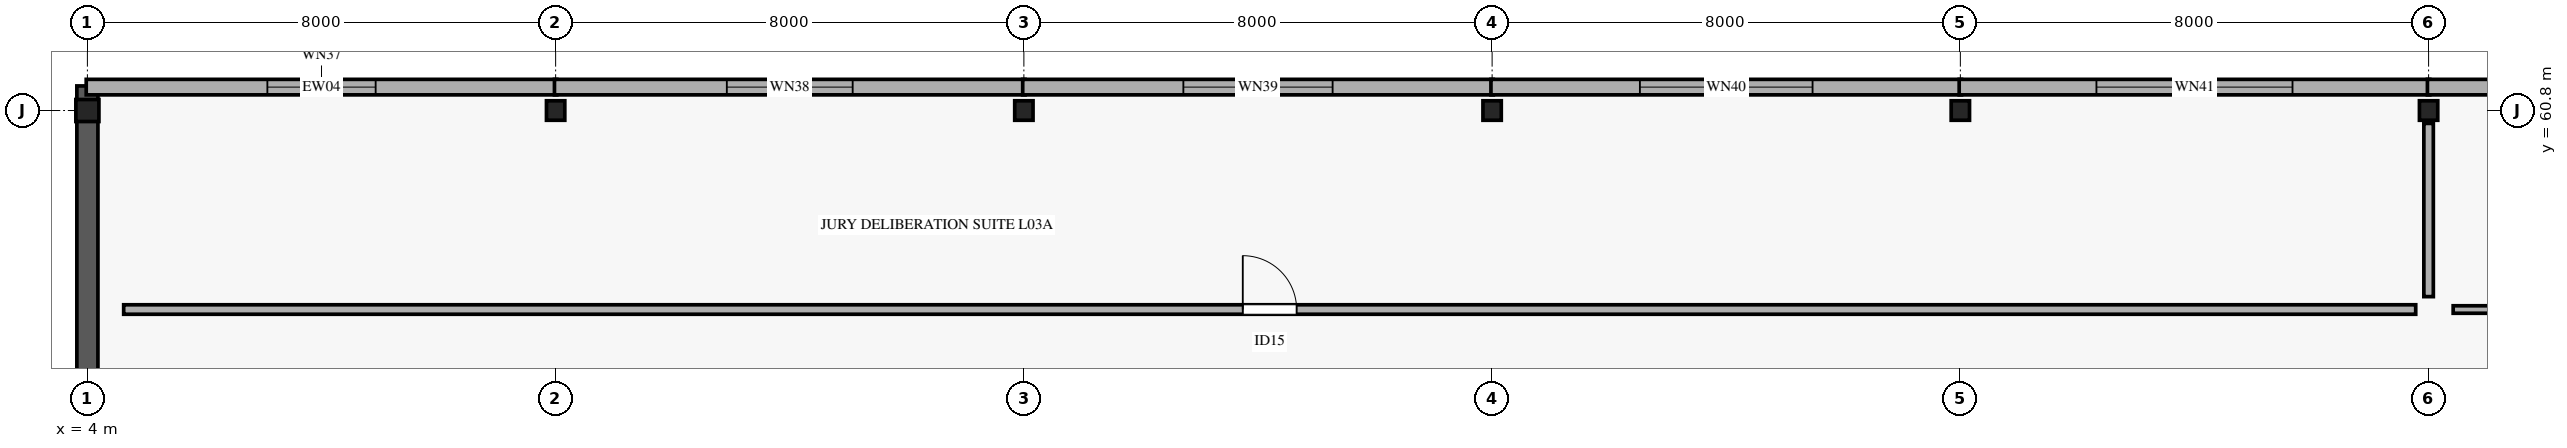
"""IFC4 building model, lengths in metres.
Left out: names, types, materials, properties, quantities, classifications, styles, units other than length and angle.
Written with IfcOpenShell. Run it as: python <this file> out.ifc"""

import sys

from ifc_helpers import new_model, si_unit, direction, frame, frame_2d, origin, origin_2d, place, context, subcontext, project, spatial, rectangle, i_section, extrude, element, fill, save


model = new_model("IFC4")
c1 = context("Model", 3, precision=1e-05, world=origin(), true_north=direction((0.0, 1.0)))
c2 = subcontext(c1, "Body", "Model", "MODEL_VIEW")
j1 = project(units=[si_unit("LENGTHUNIT", "METRE"), si_unit("PLANEANGLEUNIT", "RADIAN")], contexts=[c1])
p1 = place(None, origin())
s1 = spatial("IfcSite", under=j1, at=p1, CompositionType="ELEMENT")
p2 = place(p1, origin())
s2 = spatial("IfcBuilding", under=s1, at=p2, CompositionType="ELEMENT")
p3 = place(p2, frame((0.0, 0.0, 15.6)))
s3 = spatial("IfcBuildingStorey", under=s2, at=p3, CompositionType="ELEMENT", Elevation=15.6)
p4 = place(p3, frame((4.0, 60.8, 0.0), z_axis=(0.0, 0.0, 1.0), x_axis=(1.0, 0.0, 0.0)))
e1 = element("IfcColumn", 1, at=p4, inside=s3, PredefinedType="COLUMN", context=c2, shape_type="SweptSolid", body=[
    extrude(i_section(OverallWidth=0.394, OverallDepth=0.376, WebThickness=0.017, FlangeThickness=0.028, FilletRadius=0.015, at=origin_2d()), origin(), (0.0, 0.0, 1.0), 4.59),
])
for number, where, z_axis, x_axis in (
    (2, (12.0, 60.8, 0.0), (0.0, 0.0, 1.0), (1.0, 0.0, 0.0)),
    (3, (20.0, 60.8, 0.0), (0.0, 0.0, 1.0), (1.0, 0.0, 0.0)),
    (4, (28.0, 60.8, 0.0), (0.0, 0.0, 1.0), (1.0, 0.0, 0.0)),
    (5, (36.0, 60.8, 0.0), (0.0, 0.0, 1.0), (1.0, 0.0, 0.0)),
    (6, (44.0, 60.8, 0.0), (0.0, 0.0, 1.0), (1.0, 0.0, 0.0)),
):
    element("IfcColumn", number, at=place(p3, frame(where, z_axis=z_axis, x_axis=x_axis)), inside=s3, PredefinedType="COLUMN", context=c2, shape_type="SweptSolid", body=[
        extrude(i_section(OverallWidth=0.313, OverallDepth=0.333, WebThickness=0.018, FlangeThickness=0.028, FilletRadius=0.015, at=origin_2d()), origin(), (0.0, 0.0, 1.0), 4.59),
    ])
p5 = place(p3, frame((4.0, 53.18, 0.0), z_axis=(0.0, 0.0, 1.0), x_axis=(0.0, 1.0, 0.0)))
e7 = element("IfcWall", 7, at=p5, inside=s3, PredefinedType="STANDARD", context=c2, shape_type="SweptSolid", body=[
    extrude(rectangle(XDim=8.04, YDim=0.36, at=frame_2d((4.02, 0.0))), origin(), (0.0, 0.0, 1.0), 4.6),
])
p6 = place(p3, frame((3.98, 61.2, 0.0), z_axis=(0.0, 0.0, 1.0), x_axis=(1.0, 0.0, 0.0)))
e8 = element("IfcWall", 8, at=p6, inside=s3, PredefinedType="STANDARD", context=c2, shape_type="SweptSolid", body=[
    extrude(rectangle(XDim=8.04, YDim=0.265, at=frame_2d((4.02, 0.0))), origin(), (0.0, 0.0, 1.0), 3.66),
])
p7 = place(p6, frame((3.095, 0.0, 0.75)))
e9 = element("IfcOpeningElement", 9, at=p7, cuts=e8, PredefinedType="OPENING", context=c2, shape_type="SweptSolid", body=[
    extrude(rectangle(XDim=1.85, YDim=1.9, at=frame_2d((0.925, 0.95))), frame((0.0, 0.142, 0.0), z_axis=(0.0, -1.0, 0.0), x_axis=(1.0, 0.0, 0.0)), (0.0, 0.0, 1.0), 0.285),
])
p8 = place(p3, frame((11.98, 61.2, 0.0), z_axis=(0.0, 0.0, 1.0), x_axis=(1.0, 0.0, 0.0)))
e10 = element("IfcWall", 10, at=p8, inside=s3, PredefinedType="STANDARD", context=c2, shape_type="SweptSolid", body=[
    extrude(rectangle(XDim=8.04, YDim=0.265, at=frame_2d((4.02, 0.0))), origin(), (0.0, 0.0, 1.0), 3.66),
])
p9 = place(p8, frame((2.945, 0.0, 0.75)))
e11 = element("IfcOpeningElement", 11, at=p9, cuts=e10, PredefinedType="OPENING", context=c2, shape_type="SweptSolid", body=[
    extrude(rectangle(XDim=2.15, YDim=1.9, at=frame_2d((1.075, 0.95))), frame((0.0, 0.142, 0.0), z_axis=(0.0, -1.0, 0.0), x_axis=(1.0, 0.0, 0.0)), (0.0, 0.0, 1.0), 0.285),
])
p10 = place(p3, frame((19.98, 61.2, 0.0), z_axis=(0.0, 0.0, 1.0), x_axis=(1.0, 0.0, 0.0)))
e12 = element("IfcWall", 12, at=p10, inside=s3, PredefinedType="STANDARD", context=c2, shape_type="SweptSolid", body=[
    extrude(rectangle(XDim=8.04, YDim=0.265, at=frame_2d((4.02, 0.0))), origin(), (0.0, 0.0, 1.0), 3.66),
])
p11 = place(p10, frame((2.745, 0.0, 0.75)))
e13 = element("IfcOpeningElement", 13, at=p11, cuts=e12, PredefinedType="OPENING", context=c2, shape_type="SweptSolid", body=[
    extrude(rectangle(XDim=2.55, YDim=1.9, at=frame_2d((1.275, 0.95))), frame((0.0, 0.142, 0.0), z_axis=(0.0, -1.0, 0.0), x_axis=(1.0, 0.0, 0.0)), (0.0, 0.0, 1.0), 0.285),
])
p12 = place(p3, frame((27.98, 61.2, 0.0), z_axis=(0.0, 0.0, 1.0), x_axis=(1.0, 0.0, 0.0)))
e14 = element("IfcWall", 14, at=p12, inside=s3, PredefinedType="STANDARD", context=c2, shape_type="SweptSolid", body=[
    extrude(rectangle(XDim=8.04, YDim=0.265, at=frame_2d((4.02, 0.0))), origin(), (0.0, 0.0, 1.0), 3.66),
])
p13 = place(p12, frame((2.545, 0.0, 0.75)))
e15 = element("IfcOpeningElement", 15, at=p13, cuts=e14, PredefinedType="OPENING", context=c2, shape_type="SweptSolid", body=[
    extrude(rectangle(XDim=2.95, YDim=1.9, at=frame_2d((1.475, 0.95))), frame((0.0, 0.142, 0.0), z_axis=(0.0, -1.0, 0.0), x_axis=(1.0, 0.0, 0.0)), (0.0, 0.0, 1.0), 0.285),
])
p14 = place(p3, frame((35.98, 61.2, 0.0), z_axis=(0.0, 0.0, 1.0), x_axis=(1.0, 0.0, 0.0)))
e16 = element("IfcWall", 16, at=p14, inside=s3, PredefinedType="STANDARD", context=c2, shape_type="SweptSolid", body=[
    extrude(rectangle(XDim=8.04, YDim=0.265, at=frame_2d((4.02, 0.0))), origin(), (0.0, 0.0, 1.0), 3.66),
])
p15 = place(p14, frame((2.345, 0.0, 0.75)))
e17 = element("IfcOpeningElement", 17, at=p15, cuts=e16, PredefinedType="OPENING", context=c2, shape_type="SweptSolid", body=[
    extrude(rectangle(XDim=3.35, YDim=1.9, at=frame_2d((1.675, 0.95))), frame((0.0, 0.142, 0.0), z_axis=(0.0, -1.0, 0.0), x_axis=(1.0, 0.0, 0.0)), (0.0, 0.0, 1.0), 0.285),
])
p16 = place(p3, frame((43.98, 61.2, 0.0), z_axis=(0.0, 0.0, 1.0), x_axis=(1.0, 0.0, 0.0)))
e18 = element("IfcWall", 18, at=p16, inside=s3, PredefinedType="STANDARD", context=c2, shape_type="SweptSolid", body=[
    extrude(rectangle(XDim=8.04, YDim=0.265, at=frame_2d((4.02, 0.0))), origin(), (0.0, 0.0, 1.0), 3.66),
])
p17 = place(p16, frame((3.32, 0.0, 0.75)))
e19 = element("IfcOpeningElement", 19, at=p17, cuts=e18, PredefinedType="OPENING", context=c2, shape_type="SweptSolid", body=[
    extrude(rectangle(XDim=1.4, YDim=1.65, at=frame_2d((0.7, 0.825))), frame((0.0, 0.142, 0.0), z_axis=(0.0, -1.0, 0.0), x_axis=(1.0, 0.0, 0.0)), (0.0, 0.0, 1.0), 0.285),
])
p18 = place(p3, frame((4.62, 57.4, 0.0), z_axis=(0.0, 0.0, 1.0), x_axis=(1.0, 0.0, 0.0)))
e20 = element("IfcWall", 20, at=p18, inside=s3, PredefinedType="PARTITIONING", context=c2, shape_type="SweptSolid", body=[
    extrude(rectangle(XDim=39.16, YDim=0.162, at=frame_2d((19.58, 0.0))), origin(), (0.0, 0.0, 1.0), 3.45),
])
p19 = place(p18, frame((19.12, 0.0, 0.0)))
e21 = element("IfcOpeningElement", 21, at=p19, cuts=e20, PredefinedType="OPENING", context=c2, shape_type="SweptSolid", body=[
    extrude(rectangle(XDim=0.92, YDim=2.2, at=frame_2d((0.46, 1.1))), frame((0.0, 0.091, 0.0), z_axis=(0.0, -1.0, 0.0), x_axis=(1.0, 0.0, 0.0)), (0.0, 0.0, 1.0), 0.182),
])
p20 = place(p3, frame((44.0, 57.62, 0.0), z_axis=(0.0, 0.0, 1.0), x_axis=(0.0, 1.0, 0.0)))
e22 = element("IfcWall", 22, at=p20, inside=s3, PredefinedType="PARTITIONING", context=c2, shape_type="SweptSolid", body=[
    extrude(rectangle(XDim=2.96, YDim=0.162, at=frame_2d((1.48, 0.0))), origin(), (0.0, 0.0, 1.0), 3.45),
])
p21 = place(p3, frame((44.42, 57.4, 0.0), z_axis=(0.0, 0.0, 1.0), x_axis=(1.0, 0.0, 0.0)))
e23 = element("IfcWall", 23, at=p21, inside=s3, PredefinedType="PARTITIONING", context=c2, shape_type="SweptSolid", body=[
    extrude(rectangle(XDim=22.96, YDim=0.128, at=frame_2d((11.48, 0.0))), origin(), (0.0, 0.0, 1.0), 3.45),
])
p22 = place(p21, frame((10.705, 0.0, 0.0)))
e24 = element("IfcOpeningElement", 24, at=p22, cuts=e23, PredefinedType="OPENING", context=c2, shape_type="SweptSolid", body=[
    extrude(rectangle(XDim=1.55, YDim=2.3, at=frame_2d((0.775, 1.15))), frame((0.0, 0.074, 0.0), z_axis=(0.0, -1.0, 0.0), x_axis=(1.0, 0.0, 0.0)), (0.0, 0.0, 1.0), 0.148),
])
p23 = place(p7, origin())
e25 = element("IfcWindow", 25, at=p23, inside=s3, PartitioningType="SINGLE_PANEL", PredefinedType="WINDOW", context=c2, shape_type="SweptSolid", body=[
    extrude(rectangle(XDim=1.85, YDim=1.9, at=frame_2d((0.925, 0.95))), frame((0.0, 0.03, 0.0), z_axis=(0.0, -1.0, 0.0), x_axis=(1.0, 0.0, 0.0)), (0.0, 0.0, 1.0), 0.06),
])
fill(e9, e25)
p24 = place(p9, origin())
e26 = element("IfcWindow", 26, at=p24, inside=s3, PartitioningType="SINGLE_PANEL", PredefinedType="WINDOW", context=c2, shape_type="SweptSolid", body=[
    extrude(rectangle(XDim=2.15, YDim=1.9, at=frame_2d((1.075, 0.95))), frame((0.0, 0.03, 0.0), z_axis=(0.0, -1.0, 0.0), x_axis=(1.0, 0.0, 0.0)), (0.0, 0.0, 1.0), 0.06),
])
fill(e11, e26)
p25 = place(p11, origin())
e27 = element("IfcWindow", 27, at=p25, inside=s3, PartitioningType="SINGLE_PANEL", PredefinedType="WINDOW", context=c2, shape_type="SweptSolid", body=[
    extrude(rectangle(XDim=2.55, YDim=1.9, at=frame_2d((1.275, 0.95))), frame((0.0, 0.03, 0.0), z_axis=(0.0, -1.0, 0.0), x_axis=(1.0, 0.0, 0.0)), (0.0, 0.0, 1.0), 0.06),
])
fill(e13, e27)
p26 = place(p13, origin())
e28 = element("IfcWindow", 28, at=p26, inside=s3, PartitioningType="SINGLE_PANEL", PredefinedType="WINDOW", context=c2, shape_type="SweptSolid", body=[
    extrude(rectangle(XDim=2.95, YDim=1.9, at=frame_2d((1.475, 0.95))), frame((0.0, 0.03, 0.0), z_axis=(0.0, -1.0, 0.0), x_axis=(1.0, 0.0, 0.0)), (0.0, 0.0, 1.0), 0.06),
])
fill(e15, e28)
p27 = place(p15, origin())
e29 = element("IfcWindow", 29, at=p27, inside=s3, PartitioningType="SINGLE_PANEL", PredefinedType="WINDOW", context=c2, shape_type="SweptSolid", body=[
    extrude(rectangle(XDim=3.35, YDim=1.9, at=frame_2d((1.675, 0.95))), frame((0.0, 0.03, 0.0), z_axis=(0.0, -1.0, 0.0), x_axis=(1.0, 0.0, 0.0)), (0.0, 0.0, 1.0), 0.06),
])
fill(e17, e29)
p28 = place(p19, origin())
e30 = element("IfcDoor", 30, at=p28, inside=s3, OperationType="SINGLE_SWING_LEFT", PredefinedType="DOOR", context=c2, shape_type="SweptSolid", body=[
    extrude(rectangle(XDim=0.92, YDim=2.2, at=frame_2d((0.46, 1.1))), frame((0.0, 0.025, 0.0), z_axis=(0.0, -1.0, 0.0), x_axis=(1.0, 0.0, 0.0)), (0.0, 0.0, 1.0), 0.05),
])
fill(e21, e30)
save(model, sys.argv[1])
